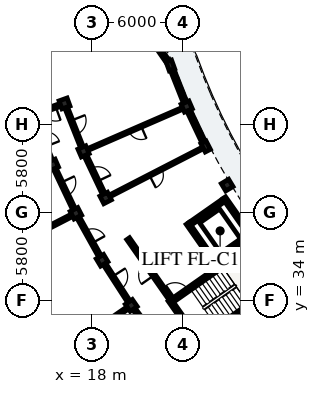
"""IFC4 building model, lengths in metres.
Left out: names, types, materials, properties, quantities, classifications, styles, units other than length and angle.
Written with IfcOpenShell. Run it as: python <this file> out.ifc"""

import sys

from ifc_helpers import new_model, si_unit, direction, frame, frame_2d, origin, origin_2d, place, context, subcontext, project, spatial, rectangle, extrude, element, fill, save


model = new_model("IFC4")
c1 = context("Model", 3, precision=1e-05, world=origin(), true_north=direction((0.0, 1.0)))
c2 = subcontext(c1, "Body", "Model", "MODEL_VIEW")
j1 = project(units=[si_unit("LENGTHUNIT", "METRE"), si_unit("PLANEANGLEUNIT", "RADIAN")], contexts=[c1])
p1 = place(None, origin())
s1 = spatial("IfcSite", under=j1, at=p1, CompositionType="ELEMENT")
p2 = place(p1, origin())
s2 = spatial("IfcBuilding", under=s1, at=p2, CompositionType="ELEMENT")
p3 = place(p2, frame((0.0, 0.0, 22.28)))
s3 = spatial("IfcBuildingStorey", under=s2, at=p3, CompositionType="ELEMENT", Elevation=22.28)
p4 = place(p3, frame((25.114, 31.414, 0.0), z_axis=(0.0, 0.0, 1.0), x_axis=(0.819141541656, 0.573591435374, 0.0)))
e1 = element("IfcWall", 1, at=p4, inside=s3, PredefinedType="SHEAR", context=c2, shape_type="SweptSolid", body=[
    extrude(rectangle(XDim=6.6, YDim=0.25, at=frame_2d((3.3, 0.0))), origin(), (0.0, 0.0, 1.0), 3.11),
])
p5 = place(p3, frame((25.083, 31.24, 0.0), z_axis=(0.0, 0.0, 1.0), x_axis=(-0.573582112484, 0.819148069789, 0.0)))
e2 = element("IfcWall", 2, at=p5, inside=s3, PredefinedType="SHEAR", context=c2, shape_type="SweptSolid", body=[
    extrude(rectangle(XDim=3.42, YDim=0.25, at=frame_2d((1.71, 0.0))), origin(), (0.0, 0.0, 1.0), 3.11),
])
p6 = place(p3, frame((23.296, 34.01, 0.0), z_axis=(0.0, 0.0, 1.0), x_axis=(0.819153711596, 0.573574055182, 0.0)))
e3 = element("IfcWall", 3, at=p6, inside=s3, PredefinedType="SHEAR", context=c2, shape_type="SweptSolid", body=[
    extrude(rectangle(XDim=6.6, YDim=0.25, at=frame_2d((3.3, 0.0))), origin(), (0.0, 0.0, 1.0), 3.11),
])
p7 = place(p6, frame((0.22, 0.0, 0.0)))
e4 = element("IfcOpeningElement", 4, at=p7, cuts=e3, PredefinedType="OPENING", context=c2, shape_type="SweptSolid", body=[
    extrude(rectangle(XDim=1.05, YDim=2.15, at=frame_2d((0.525, 1.075))), frame((0.0, 0.135, 0.0), z_axis=(0.0, -1.0, 0.0), x_axis=(1.0, 0.0, 0.0)), (0.0, 0.0, 1.0), 0.27),
])
p8 = place(p3, frame((26.169, 36.419, 0.0), z_axis=(0.0, 0.0, 1.0), x_axis=(-0.573582966431, 0.819147471839, 0.0)))
e5 = element("IfcWall", 5, at=p8, inside=s3, PredefinedType="SHEAR", context=c2, shape_type="SweptSolid", body=[
    extrude(rectangle(XDim=3.26, YDim=0.23, at=frame_2d((1.63, 0.0))), origin(), (0.0, 0.0, 1.0), 3.11),
])
p9 = place(p8, frame((0.9, 0.0, 0.0)))
e6 = element("IfcOpeningElement", 6, at=p9, cuts=e5, PredefinedType="OPENING", context=c2, shape_type="SweptSolid", body=[
    extrude(rectangle(XDim=1.1, YDim=2.15, at=frame_2d((0.55, 1.075))), frame((0.0, 0.125, 0.0), z_axis=(0.0, -1.0, 0.0), x_axis=(1.0, 0.0, 0.0)), (0.0, 0.0, 1.0), 0.25),
])
p10 = place(p3, frame((28.569, 38.1, 0.0), z_axis=(0.0, 0.0, 1.0), x_axis=(-0.573582966431, 0.819147471839, 0.0)))
e7 = element("IfcWall", 7, at=p10, inside=s3, PredefinedType="SHEAR", context=c2, shape_type="SweptSolid", body=[
    extrude(rectangle(XDim=3.26, YDim=0.23, at=frame_2d((1.63, 0.0))), origin(), (0.0, 0.0, 1.0), 3.11),
])
p11 = place(p3, frame((26.197, 36.579, 0.0), z_axis=(0.0, 0.0, 1.0), x_axis=(0.819159695432, 0.573565509231, 0.0)))
e8 = element("IfcWall", 8, at=p11, inside=s3, PredefinedType="SHEAR", context=c2, shape_type="SweptSolid", body=[
    extrude(rectangle(XDim=2.7, YDim=0.23, at=frame_2d((1.35, 0.0))), origin(), (0.0, 0.0, 1.0), 3.11),
])
p12 = place(p3, frame((24.459, 39.061, 0.0), z_axis=(0.0, 0.0, 1.0), x_axis=(0.819189439894, 0.573523026186, 0.0)))
e9 = element("IfcWall", 9, at=p12, inside=s3, PredefinedType="SHEAR", context=c2, shape_type="SweptSolid", body=[
    extrude(rectangle(XDim=2.7, YDim=0.23, at=frame_2d((1.35, 0.0))), origin(), (0.0, 0.0, 1.0), 3.11),
])
p13 = place(p3, frame((23.165, 49.479, 0.0), z_axis=(0.0, 0.0, 1.0), x_axis=(-0.941176015256, -0.337916718003, 0.0)))
e10 = element("IfcColumn", 10, at=p13, inside=s3, PredefinedType="PILASTER", context=c2, shape_type="SweptSolid", body=[
    extrude(rectangle(XDim=0.38, YDim=0.62, at=origin_2d()), origin(), (0.0, 0.0, 1.0), 3.11),
])
for number, where, z_axis, x_axis in (
    (11, (16.2, 46.979, 0.0), (0.0, 0.0, 1.0), (-0.941, -0.338, 0.0)),
    (12, (24.237, 46.776, 0.0), (0.0, 0.0, 1.0), (-0.917, -0.399, 0.0)),
    (13, (17.45, 43.825, 0.0), (0.0, 0.0, 1.0), (-0.917, -0.399, 0.0)),
    (14, (15.433, 42.948, 0.0), (0.0, 0.0, 1.0), (-0.917, -0.399, 0.0)),
):
    element("IfcColumn", number, at=place(p3, frame(where, z_axis=z_axis, x_axis=x_axis)), inside=s3, PredefinedType="COLUMN", context=c2, shape_type="SweptSolid", body=[
        extrude(rectangle(XDim=0.56, YDim=0.56, at=origin_2d()), origin(), (0.0, 0.0, 1.0), 3.11),
    ])
p14 = place(p3, frame((25.483, 44.147, 0.0), z_axis=(0.0, 0.0, 1.0), x_axis=(-0.889017141486, -0.457873915117, 0.0)))
e15 = element("IfcColumn", 15, at=p14, inside=s3, PredefinedType="PILASTER", context=c2, shape_type="SweptSolid", body=[
    extrude(rectangle(XDim=0.38, YDim=0.62, at=origin_2d()), origin(), (0.0, 0.0, 1.0), 3.11),
])
for number, where, z_axis, x_axis in (
    (16, (18.905, 40.759, 0.0), (0.0, 0.0, 1.0), (-0.889, -0.458, 0.0)),
    (17, (16.949, 39.752, 0.0), (0.0, 0.0, 1.0), (-0.889, -0.458, 0.0)),
    (18, (26.899, 41.606, 0.0), (0.0, 0.0, 1.0), (-0.857, -0.515, 0.0)),
    (19, (18.67, 36.662, 0.0), (0.0, 0.0, 1.0), (-0.857, -0.515, 0.0)),
    (20, (20.59, 33.692, 0.0), (0.0, 0.0, 1.0), (-0.822, -0.57, 0.0)),
):
    element("IfcColumn", number, at=place(p3, frame(where, z_axis=z_axis, x_axis=x_axis)), inside=s3, PredefinedType="COLUMN", context=c2, shape_type="SweptSolid", body=[
        extrude(rectangle(XDim=0.56, YDim=0.56, at=origin_2d()), origin(), (0.0, 0.0, 1.0), 3.11),
    ])
p15 = place(p3, frame((23.224, 49.331, 0.0), z_axis=(0.0, 0.0, 1.0), x_axis=(0.368558756085, -0.9296044553, 0.0)))
e21 = element("IfcWall", 21, at=p15, inside=s3, PredefinedType="SOLIDWALL", context=c2, shape_type="SweptSolid", body=[
    extrude(rectangle(XDim=2.499, YDim=0.245, at=frame_2d((1.249, 0.0))), origin(), (0.0, 0.0, 1.0), 2.355),
])
p16 = place(p15, frame((0.549, 0.0, 0.55)))
e22 = element("IfcOpeningElement", 22, at=p16, cuts=e21, PredefinedType="OPENING", context=c2, shape_type="SweptSolid", body=[
    extrude(rectangle(XDim=1.4, YDim=1.635, at=frame_2d((0.7, 0.817))), frame((0.0, 0.133, 0.0), z_axis=(0.0, -1.0, 0.0), x_axis=(1.0, 0.0, 0.0)), (0.0, 0.0, 1.0), 0.265),
])
p17 = place(p3, frame((24.344, 46.55, 0.0), z_axis=(0.0, 0.0, 1.0), x_axis=(0.428514676045, -0.903534820809, 0.0)))
e23 = element("IfcWall", 23, at=p17, inside=s3, PredefinedType="SOLIDWALL", context=c2, shape_type="SweptSolid", body=[
    extrude(rectangle(XDim=2.499, YDim=0.245, at=frame_2d((1.25, 0.0))), origin(), (0.0, 0.0, 1.0), 2.355),
])
p18 = place(p17, frame((0.49, 0.0, 0.55)))
e24 = element("IfcOpeningElement", 24, at=p18, cuts=e23, PredefinedType="OPENING", context=c2, shape_type="SweptSolid", body=[
    extrude(rectangle(XDim=1.52, YDim=1.485, at=frame_2d((0.76, 0.743))), frame((0.0, 0.133, 0.0), z_axis=(0.0, -1.0, 0.0), x_axis=(1.0, 0.0, 0.0)), (0.0, 0.0, 1.0), 0.265),
])
p19 = place(p3, frame((20.937, 52.691, 0.0), z_axis=(0.0, 0.0, 1.0), x_axis=(0.570015285568, -0.82163408779, 0.0)))
e25 = element("IfcWall", 25, at=p19, inside=s3, PredefinedType="SOLIDWALL", context=c2, shape_type="SweptSolid", body=[
    extrude(rectangle(XDim=3.908, YDim=0.245, at=frame_2d((1.954, 0.0))), origin(), (0.0, 0.0, 1.0), 2.355),
])
p20 = place(p19, frame((0.979, 0.0, 0.4)))
e26 = element("IfcOpeningElement", 26, at=p20, cuts=e25, PredefinedType="OPENING", context=c2, shape_type="SweptSolid", body=[
    extrude(rectangle(XDim=1.95, YDim=1.78, at=frame_2d((0.975, 0.89))), frame((0.0, 0.133, 0.0), z_axis=(0.0, -1.0, 0.0), x_axis=(1.0, 0.0, 0.0)), (0.0, 0.0, 1.0), 0.265),
])
p21 = place(p3, frame((23.195, 34.068, 0.0), z_axis=(0.0, 0.0, 1.0), x_axis=(-0.573572687386, 0.819154669329, 0.0)))
e27 = element("IfcWall", 27, at=p21, inside=s3, PredefinedType="PARTITIONING", context=c2, shape_type="SweptSolid", body=[
    extrude(rectangle(XDim=4.9, YDim=0.22, at=frame_2d((2.45, 0.0))), origin(), (0.0, 0.0, 1.0), 2.34),
])
p22 = place(p21, frame((1.95, 0.0, 0.0)))
e28 = element("IfcOpeningElement", 28, at=p22, cuts=e27, PredefinedType="OPENING", context=c2, shape_type="SweptSolid", body=[
    extrude(rectangle(XDim=1.0, YDim=2.15, at=frame_2d((0.5, 1.075))), frame((0.0, 0.12, 0.0), z_axis=(0.0, -1.0, 0.0), x_axis=(1.0, 0.0, 0.0)), (0.0, 0.0, 1.0), 0.24),
])
p23 = place(p3, frame((14.258, 45.91, 0.0), z_axis=(0.0, 0.0, 1.0), x_axis=(0.368584691693, -0.929594172233, 0.0)))
e29 = element("IfcWall", 29, at=p23, inside=s3, PredefinedType="PARTITIONING", context=c2, shape_type="SweptSolid", body=[
    extrude(rectangle(XDim=2.837, YDim=0.195, at=frame_2d((1.418, 0.0))), origin(), (0.0, 0.0, 1.0), 2.37),
])
p24 = place(p23, frame((0.934, 0.0, 0.0)))
e30 = element("IfcOpeningElement", 30, at=p24, cuts=e29, PredefinedType="OPENING", context=c2, shape_type="SweptSolid", body=[
    extrude(rectangle(XDim=0.97, YDim=2.15, at=frame_2d((0.485, 1.075))), frame((0.0, 0.107, 0.0), z_axis=(0.0, -1.0, 0.0), x_axis=(1.0, 0.0, 0.0)), (0.0, 0.0, 1.0), 0.215),
])
p25 = place(p3, frame((16.329, 46.654, 0.0), z_axis=(0.0, 0.0, 1.0), x_axis=(0.368528468945, -0.929616462622, 0.0)))
e31 = element("IfcWall", 31, at=p25, inside=s3, PredefinedType="PARTITIONING", context=c2, shape_type="SweptSolid", body=[
    extrude(rectangle(XDim=2.693, YDim=0.195, at=frame_2d((1.346, 0.0))), origin(), (0.0, 0.0, 1.0), 2.37),
])
p26 = place(p25, frame((0.862, 0.0, 0.0)))
e32 = element("IfcOpeningElement", 32, at=p26, cuts=e31, PredefinedType="OPENING", context=c2, shape_type="SweptSolid", body=[
    extrude(rectangle(XDim=0.97, YDim=2.15, at=frame_2d((0.485, 1.075))), frame((0.0, 0.107, 0.0), z_axis=(0.0, -1.0, 0.0), x_axis=(1.0, 0.0, 0.0)), (0.0, 0.0, 1.0), 0.215),
])
p27 = place(p3, frame((23.87, 46.616, 0.0), z_axis=(0.0, 0.0, 1.0), x_axis=(-0.9170582943, -0.398753162817, 0.0)))
e33 = element("IfcWall", 33, at=p27, inside=s3, PredefinedType="PARTITIONING", context=c2, shape_type="SweptSolid", body=[
    extrude(rectangle(XDim=6.6, YDim=0.125, at=frame_2d((3.3, 0.0))), origin(), (0.0, 0.0, 1.0), 2.37),
])
p28 = place(p27, frame((2.865, 0.0, 0.0)))
e34 = element("IfcOpeningElement", 34, at=p28, cuts=e33, PredefinedType="OPENING", context=c2, shape_type="SweptSolid", body=[
    extrude(rectangle(XDim=0.87, YDim=2.08, at=frame_2d((0.435, 1.04))), frame((0.0, 0.073, 0.0), z_axis=(0.0, -1.0, 0.0), x_axis=(1.0, 0.0, 0.0)), (0.0, 0.0, 1.0), 0.145),
])
p29 = place(p3, frame((15.583, 42.631, 0.0), z_axis=(0.0, 0.0, 1.0), x_axis=(0.428493237107, -0.903544988229, 0.0)))
e35 = element("IfcWall", 35, at=p29, inside=s3, PredefinedType="PARTITIONING", context=c2, shape_type="SweptSolid", body=[
    extrude(rectangle(XDim=2.837, YDim=0.195, at=frame_2d((1.418, 0.0))), origin(), (0.0, 0.0, 1.0), 2.37),
])
p30 = place(p29, frame((0.944, 0.0, 0.0)))
e36 = element("IfcOpeningElement", 36, at=p30, cuts=e35, PredefinedType="OPENING", context=c2, shape_type="SweptSolid", body=[
    extrude(rectangle(XDim=0.95, YDim=2.13, at=frame_2d((0.475, 1.065))), frame((0.0, 0.107, 0.0), z_axis=(0.0, -1.0, 0.0), x_axis=(1.0, 0.0, 0.0)), (0.0, 0.0, 1.0), 0.215),
])
p31 = place(p3, frame((17.6, 43.509, 0.0), z_axis=(0.0, 0.0, 1.0), x_axis=(0.428550049392, -0.903518043631, 0.0)))
e37 = element("IfcWall", 37, at=p31, inside=s3, PredefinedType="PARTITIONING", context=c2, shape_type="SweptSolid", body=[
    extrude(rectangle(XDim=2.693, YDim=0.195, at=frame_2d((1.346, 0.0))), origin(), (0.0, 0.0, 1.0), 2.37),
])
p32 = place(p31, frame((0.872, 0.0, 0.0)))
e38 = element("IfcOpeningElement", 38, at=p32, cuts=e37, PredefinedType="OPENING", context=c2, shape_type="SweptSolid", body=[
    extrude(rectangle(XDim=0.95, YDim=2.13, at=frame_2d((0.475, 1.065))), frame((0.0, 0.107, 0.0), z_axis=(0.0, -1.0, 0.0), x_axis=(1.0, 0.0, 0.0)), (0.0, 0.0, 1.0), 0.215),
])
p33 = place(p3, frame((16.593, 39.569, 0.0), z_axis=(0.0, 0.0, 1.0), x_axis=(-0.889013002038, -0.457881952262, 0.0)))
e39 = element("IfcWall", 39, at=p33, inside=s3, PredefinedType="PARTITIONING", context=c2, shape_type="SweptSolid", body=[
    extrude(rectangle(XDim=4.7, YDim=0.175, at=frame_2d((2.35, 0.0))), origin(), (0.0, 0.0, 1.0), 2.37),
])
p34 = place(p3, frame((25.128, 43.964, 0.0), z_axis=(0.0, 0.0, 1.0), x_axis=(-0.889022010753, -0.457864460727, 0.0)))
e40 = element("IfcWall", 40, at=p34, inside=s3, PredefinedType="PARTITIONING", context=c2, shape_type="SweptSolid", body=[
    extrude(rectangle(XDim=6.6, YDim=0.125, at=frame_2d((3.3, 0.0))), origin(), (0.0, 0.0, 1.0), 2.37),
])
p35 = place(p34, frame((2.845, 0.0, 0.0)))
e41 = element("IfcOpeningElement", 41, at=p35, cuts=e40, PredefinedType="OPENING", context=c2, shape_type="SweptSolid", body=[
    extrude(rectangle(XDim=0.91, YDim=2.1, at=frame_2d((0.455, 1.05))), frame((0.0, 0.073, 0.0), z_axis=(0.0, -1.0, 0.0), x_axis=(1.0, 0.0, 0.0)), (0.0, 0.0, 1.0), 0.145),
])
p36 = place(p3, frame((17.119, 39.446, 0.0), z_axis=(0.0, 0.0, 1.0), x_axis=(0.48673124079, -0.8735517725, 0.0)))
e42 = element("IfcWall", 42, at=p36, inside=s3, PredefinedType="PARTITIONING", context=c2, shape_type="SweptSolid", body=[
    extrude(rectangle(XDim=2.837, YDim=0.195, at=frame_2d((1.418, 0.0))), origin(), (0.0, 0.0, 1.0), 2.37),
])
p37 = place(p36, frame((0.954, 0.0, 0.0)))
e43 = element("IfcOpeningElement", 43, at=p37, cuts=e42, PredefinedType="OPENING", context=c2, shape_type="SweptSolid", body=[
    extrude(rectangle(XDim=0.93, YDim=2.12, at=frame_2d((0.465, 1.06))), frame((0.0, 0.107, 0.0), z_axis=(0.0, -1.0, 0.0), x_axis=(1.0, 0.0, 0.0)), (0.0, 0.0, 1.0), 0.215),
])
p38 = place(p3, frame((18.86, 36.368, 0.0), z_axis=(0.0, 0.0, 1.0), x_axis=(0.542787304957, -0.83987019329, 0.0)))
e44 = element("IfcWall", 44, at=p38, inside=s3, PredefinedType="PARTITIONING", context=c2, shape_type="SweptSolid", body=[
    extrude(rectangle(XDim=2.837, YDim=0.195, at=frame_2d((1.418, 0.0))), origin(), (0.0, 0.0, 1.0), 2.37),
])
p39 = place(p38, frame((0.924, 0.0, 0.0)))
e45 = element("IfcOpeningElement", 45, at=p39, cuts=e44, PredefinedType="OPENING", context=c2, shape_type="SweptSolid", body=[
    extrude(rectangle(XDim=0.99, YDim=2.16, at=frame_2d((0.495, 1.08))), frame((0.0, 0.107, 0.0), z_axis=(0.0, -1.0, 0.0), x_axis=(1.0, 0.0, 0.0)), (0.0, 0.0, 1.0), 0.215),
])
p40 = place(p3, frame((20.261, 33.464, 0.0), z_axis=(0.0, 0.0, 1.0), x_axis=(-0.821638260647, -0.570009270663, 0.0)))
e46 = element("IfcWall", 46, at=p40, inside=s3, PredefinedType="PARTITIONING", context=c2, shape_type="SweptSolid", body=[
    extrude(rectangle(XDim=4.7, YDim=0.175, at=frame_2d((2.35, 0.0))), origin(), (0.0, 0.0, 1.0), 2.37),
])
p41 = place(p3, frame((20.799, 33.411, 0.0), z_axis=(0.0, 0.0, 1.0), x_axis=(0.596552136601, -0.802574325727, 0.0)))
e47 = element("IfcWall", 47, at=p41, inside=s3, PredefinedType="PARTITIONING", context=c2, shape_type="SweptSolid", body=[
    extrude(rectangle(XDim=2.837, YDim=0.195, at=frame_2d((1.418, 0.0))), origin(), (0.0, 0.0, 1.0), 2.37),
])
p42 = place(p41, frame((0.934, 0.0, 0.0)))
e48 = element("IfcOpeningElement", 48, at=p42, cuts=e47, PredefinedType="OPENING", context=c2, shape_type="SweptSolid", body=[
    extrude(rectangle(XDim=0.97, YDim=2.15, at=frame_2d((0.485, 1.075))), frame((0.0, 0.107, 0.0), z_axis=(0.0, -1.0, 0.0), x_axis=(1.0, 0.0, 0.0)), (0.0, 0.0, 1.0), 0.215),
])
p43 = place(p3, frame((31.801, 34.344, 0.0), z_axis=(0.0, 0.0, 1.0), x_axis=(-0.74023124711, -0.672352363573, 0.0)))
e49 = element("IfcWall", 49, at=p43, inside=s3, PredefinedType="PARTITIONING", context=c2, shape_type="SweptSolid", body=[
    extrude(rectangle(XDim=6.6, YDim=0.125, at=frame_2d((3.3, 0.0))), origin(), (0.0, 0.0, 1.0), 2.37),
])
p44 = place(p43, frame((2.855, 0.0, 0.0)))
e50 = element("IfcOpeningElement", 50, at=p44, cuts=e49, PredefinedType="OPENING", context=c2, shape_type="SweptSolid", body=[
    extrude(rectangle(XDim=0.89, YDim=2.1, at=frame_2d((0.445, 1.05))), frame((0.0, 0.073, 0.0), z_axis=(0.0, -1.0, 0.0), x_axis=(1.0, 0.0, 0.0)), (0.0, 0.0, 1.0), 0.145),
])
p45 = place(p3, frame((16.153, 46.962, 0.0), z_axis=(0.0, 0.0, 1.0), x_axis=(-0.941167179085, -0.337941327767, 0.0)))
e51 = element("IfcWall", 51, at=p45, inside=s3, PredefinedType="PARTITIONING", context=c2, shape_type="SweptSolid", body=[
    extrude(rectangle(XDim=2.1, YDim=0.195, at=frame_2d((1.05, 0.0))), origin(), (0.0, 0.0, 1.0), 2.37),
])
p46 = place(p45, frame((0.57, 0.0, 0.0)))
e52 = element("IfcOpeningElement", 52, at=p46, cuts=e51, PredefinedType="OPENING", context=c2, shape_type="SweptSolid", body=[
    extrude(rectangle(XDim=0.95, YDim=2.13, at=frame_2d((0.475, 1.065))), frame((0.0, 0.107, 0.0), z_axis=(0.0, -1.0, 0.0), x_axis=(1.0, 0.0, 0.0)), (0.0, 0.0, 1.0), 0.215),
])
p47 = place(p16, origin())
e53 = element("IfcWindow", 53, at=p47, inside=s3, PartitioningType="SINGLE_PANEL", PredefinedType="WINDOW", context=c2, shape_type="SweptSolid", body=[
    extrude(rectangle(XDim=1.4, YDim=1.635, at=frame_2d((0.7, 0.817))), frame((0.0, 0.03, 0.0), z_axis=(0.0, -1.0, 0.0), x_axis=(1.0, 0.0, 0.0)), (0.0, 0.0, 1.0), 0.06),
])
fill(e22, e53)
p48 = place(p18, origin())
e54 = element("IfcWindow", 54, at=p48, inside=s3, PartitioningType="SINGLE_PANEL", PredefinedType="WINDOW", context=c2, shape_type="SweptSolid", body=[
    extrude(rectangle(XDim=1.52, YDim=1.485, at=frame_2d((0.76, 0.743))), frame((0.0, 0.03, 0.0), z_axis=(0.0, -1.0, 0.0), x_axis=(1.0, 0.0, 0.0)), (0.0, 0.0, 1.0), 0.06),
])
fill(e24, e54)
p49 = place(p20, origin())
e55 = element("IfcWindow", 55, at=p49, inside=s3, PartitioningType="SINGLE_PANEL", PredefinedType="WINDOW", context=c2, shape_type="SweptSolid", body=[
    extrude(rectangle(XDim=1.95, YDim=1.78, at=frame_2d((0.975, 0.89))), frame((0.0, 0.03, 0.0), z_axis=(0.0, -1.0, 0.0), x_axis=(1.0, 0.0, 0.0)), (0.0, 0.0, 1.0), 0.06),
])
fill(e26, e55)
p50 = place(p7, origin())
e56 = element("IfcDoor", 56, at=p50, inside=s3, OperationType="SINGLE_SWING_LEFT", PredefinedType="DOOR", context=c2, shape_type="SweptSolid", body=[
    extrude(rectangle(XDim=1.05, YDim=2.15, at=frame_2d((0.525, 1.075))), frame((0.0, 0.025, 0.0), z_axis=(0.0, -1.0, 0.0), x_axis=(1.0, 0.0, 0.0)), (0.0, 0.0, 1.0), 0.05),
])
fill(e4, e56)
p51 = place(p9, origin())
e57 = element("IfcDoor", 57, at=p51, inside=s3, OperationType="DOUBLE_DOOR_SLIDING", PredefinedType="DOOR", context=c2, shape_type="SweptSolid", body=[
    extrude(rectangle(XDim=1.1, YDim=2.15, at=frame_2d((0.55, 1.075))), frame((0.0, 0.025, 0.0), z_axis=(0.0, -1.0, 0.0), x_axis=(1.0, 0.0, 0.0)), (0.0, 0.0, 1.0), 0.05),
])
fill(e6, e57)
p52 = place(p22, origin())
e58 = element("IfcDoor", 58, at=p52, inside=s3, OperationType="SINGLE_SWING_LEFT", PredefinedType="DOOR", context=c2, shape_type="SweptSolid", body=[
    extrude(rectangle(XDim=1.0, YDim=2.15, at=frame_2d((0.5, 1.075))), frame((0.0, 0.025, 0.0), z_axis=(0.0, -1.0, 0.0), x_axis=(1.0, 0.0, 0.0)), (0.0, 0.0, 1.0), 0.05),
])
fill(e28, e58)
p53 = place(p26, origin())
e59 = element("IfcDoor", 59, at=p53, inside=s3, OperationType="SINGLE_SWING_LEFT", PredefinedType="DOOR", context=c2, shape_type="SweptSolid", body=[
    extrude(rectangle(XDim=0.97, YDim=2.15, at=frame_2d((0.485, 1.075))), frame((0.0, 0.025, 0.0), z_axis=(0.0, -1.0, 0.0), x_axis=(1.0, 0.0, 0.0)), (0.0, 0.0, 1.0), 0.05),
])
fill(e32, e59)
p54 = place(p28, origin())
e60 = element("IfcDoor", 60, at=p54, inside=s3, OperationType="SINGLE_SWING_LEFT", PredefinedType="DOOR", context=c2, shape_type="SweptSolid", body=[
    extrude(rectangle(XDim=0.87, YDim=2.08, at=frame_2d((0.435, 1.04))), frame((0.0, 0.025, 0.0), z_axis=(0.0, -1.0, 0.0), x_axis=(1.0, 0.0, 0.0)), (0.0, 0.0, 1.0), 0.05),
])
fill(e34, e60)
p55 = place(p30, origin())
e61 = element("IfcDoor", 61, at=p55, inside=s3, OperationType="SINGLE_SWING_LEFT", PredefinedType="DOOR", context=c2, shape_type="SweptSolid", body=[
    extrude(rectangle(XDim=0.95, YDim=2.13, at=frame_2d((0.475, 1.065))), frame((0.0, 0.025, 0.0), z_axis=(0.0, -1.0, 0.0), x_axis=(1.0, 0.0, 0.0)), (0.0, 0.0, 1.0), 0.05),
])
fill(e36, e61)
p56 = place(p32, origin())
e62 = element("IfcDoor", 62, at=p56, inside=s3, OperationType="SINGLE_SWING_RIGHT", PredefinedType="DOOR", context=c2, shape_type="SweptSolid", body=[
    extrude(rectangle(XDim=0.95, YDim=2.13, at=frame_2d((0.475, 1.065))), frame((0.0, 0.025, 0.0), z_axis=(0.0, -1.0, 0.0), x_axis=(1.0, 0.0, 0.0)), (0.0, 0.0, 1.0), 0.05),
])
fill(e38, e62)
p57 = place(p35, origin())
e63 = element("IfcDoor", 63, at=p57, inside=s3, OperationType="SINGLE_SWING_RIGHT", PredefinedType="DOOR", context=c2, shape_type="SweptSolid", body=[
    extrude(rectangle(XDim=0.91, YDim=2.1, at=frame_2d((0.455, 1.05))), frame((0.0, 0.025, 0.0), z_axis=(0.0, -1.0, 0.0), x_axis=(1.0, 0.0, 0.0)), (0.0, 0.0, 1.0), 0.05),
])
fill(e41, e63)
p58 = place(p37, origin())
e64 = element("IfcDoor", 64, at=p58, inside=s3, OperationType="SINGLE_SWING_RIGHT", PredefinedType="DOOR", context=c2, shape_type="SweptSolid", body=[
    extrude(rectangle(XDim=0.93, YDim=2.12, at=frame_2d((0.465, 1.06))), frame((0.0, 0.025, 0.0), z_axis=(0.0, -1.0, 0.0), x_axis=(1.0, 0.0, 0.0)), (0.0, 0.0, 1.0), 0.05),
])
fill(e43, e64)
p59 = place(p39, origin())
e65 = element("IfcDoor", 65, at=p59, inside=s3, OperationType="SINGLE_SWING_LEFT", PredefinedType="DOOR", context=c2, shape_type="SweptSolid", body=[
    extrude(rectangle(XDim=0.99, YDim=2.16, at=frame_2d((0.495, 1.08))), frame((0.0, 0.025, 0.0), z_axis=(0.0, -1.0, 0.0), x_axis=(1.0, 0.0, 0.0)), (0.0, 0.0, 1.0), 0.05),
])
fill(e45, e65)
p60 = place(p46, origin())
e66 = element("IfcDoor", 66, at=p60, inside=s3, OperationType="SINGLE_SWING_LEFT", PredefinedType="DOOR", context=c2, shape_type="SweptSolid", body=[
    extrude(rectangle(XDim=0.95, YDim=2.13, at=frame_2d((0.475, 1.065))), frame((0.0, 0.025, 0.0), z_axis=(0.0, -1.0, 0.0), x_axis=(1.0, 0.0, 0.0)), (0.0, 0.0, 1.0), 0.05),
])
fill(e52, e66)
save(model, sys.argv[1])
